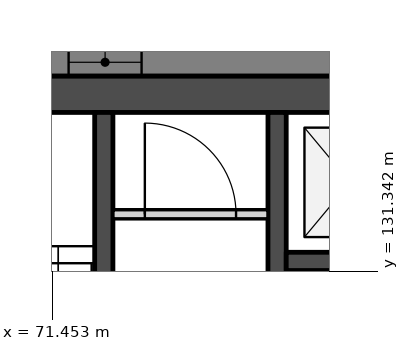
"""IFC4 building model, lengths in metres.
Left out: names, types, materials, properties, quantities, classifications, styles, units other than length and angle.
Written with IfcOpenShell. Run it as: python <this file> out.ifc"""

import sys

from ifc_helpers import new_model, si_unit, direction, frame, frame_2d, origin, place, context, subcontext, project, spatial, polyline, rectangle, outline, extrude, element, fill, save


model = new_model("IFC4")
c1 = context("Model", 3, precision=1e-05, world=origin(), true_north=direction((0.0, 1.0)))
c2 = subcontext(c1, "Body", "Model", "MODEL_VIEW")
j1 = project(units=[si_unit("LENGTHUNIT", "METRE"), si_unit("PLANEANGLEUNIT", "RADIAN")], contexts=[c1])
p1 = place(None, origin())
s1 = spatial("IfcSite", under=j1, at=p1, CompositionType="ELEMENT")
p2 = place(p1, origin())
s2 = spatial("IfcBuilding", under=s1, at=p2, CompositionType="ELEMENT")
p3 = place(p2, frame((0.0, 0.0, 81.8)))
s3 = spatial("IfcBuildingStorey", under=s2, at=p3, CompositionType="ELEMENT", Elevation=81.8)
p4 = place(p3, frame((66.0, 134.25, 0.0), z_axis=(0.0, 0.0, 1.0), x_axis=(1.0, 0.0, 0.0)))
e1 = element("IfcWall", 1, at=p4, inside=s3, PredefinedType="SOLIDWALL", context=c2, shape_type="SweptSolid", body=[
    extrude(rectangle(XDim=28.0, YDim=0.6, at=frame_2d((14.0, 0.0))), origin(), (0.0, 0.0, 1.0), 3.35),
])
p5 = place(p3, frame((72.3, 133.95, 0.0), z_axis=(0.0, 0.0, 1.0), x_axis=(0.0, -1.0, 0.0)))
e2 = element("IfcWall", 2, at=p5, inside=s3, PredefinedType="SOLIDWALL", context=c2, shape_type="SweptSolid", body=[
    extrude(rectangle(XDim=11.7, YDim=0.3, at=frame_2d((5.85, 0.0))), origin(), (0.0, 0.0, 1.0), 3.35),
])
p6 = place(p5, frame((6.95, 0.0, 0.0)))
e3 = element("IfcOpeningElement", 3, at=p6, cuts=e2, PredefinedType="OPENING", context=c2, shape_type="SweptSolid", body=[
    extrude(rectangle(XDim=1.1, YDim=2.1, at=frame_2d((0.55, 1.05))), frame((0.0, 0.16, 0.0), z_axis=(0.0, -1.0, 0.0), x_axis=(1.0, 0.0, 0.0)), (0.0, 0.0, 1.0), 0.32),
])
p7 = place(p5, frame((9.35, 0.0, 0.0)))
e4 = element("IfcOpeningElement", 4, at=p7, cuts=e2, PredefinedType="OPENING", context=c2, shape_type="SweptSolid", body=[
    extrude(rectangle(XDim=0.9, YDim=2.1, at=frame_2d((0.45, 1.05))), frame((0.0, 0.16, 0.0), z_axis=(0.0, -1.0, 0.0), x_axis=(1.0, 0.0, 0.0)), (0.0, 0.0, 1.0), 0.32),
])
p8 = place(p5, frame((5.1, 0.0, 0.0)))
e5 = element("IfcOpeningElement", 5, at=p8, cuts=e2, PredefinedType="OPENING", context=c2, shape_type="SweptSolid", body=[
    extrude(rectangle(XDim=1.0, YDim=2.1, at=frame_2d((0.5, 1.05))), frame((0.0, 0.16, 0.0), z_axis=(0.0, -1.0, 0.0), x_axis=(1.0, 0.0, 0.0)), (0.0, 0.0, 1.0), 0.32),
])
p9 = place(p3, frame((72.45, 132.275, 0.0), z_axis=(0.0, 0.0, 1.0), x_axis=(1.0, 0.0, 0.0)))
e6 = element("IfcWall", 6, at=p9, inside=s3, PredefinedType="PARTITIONING", context=c2, shape_type="SweptSolid", body=[
    extrude(rectangle(XDim=2.55, YDim=0.15, at=frame_2d((1.275, 0.0))), origin(), (0.0, 0.0, 1.0), 3.35),
])
p10 = place(p9, frame((0.525, 0.0, 0.0)))
e7 = element("IfcOpeningElement", 7, at=p10, cuts=e6, PredefinedType="OPENING", context=c2, shape_type="SweptSolid", body=[
    extrude(rectangle(XDim=1.5, YDim=2.1, at=frame_2d((0.75, 1.05))), frame((0.0, 0.085, 0.0), z_axis=(0.0, -1.0, 0.0), x_axis=(1.0, 0.0, 0.0)), (0.0, 0.0, 1.0), 0.17),
])
p11 = place(p3, frame((75.15, 133.95, 0.0), z_axis=(0.0, 0.0, 1.0), x_axis=(0.0, -1.0, 0.0)))
e8 = element("IfcWall", 8, at=p11, inside=s3, PredefinedType="SOLIDWALL", context=c2, shape_type="SweptSolid", body=[
    extrude(rectangle(XDim=11.7, YDim=0.3, at=frame_2d((5.85, 0.0))), origin(), (0.0, 0.0, 1.0), 3.35),
])
p12 = place(p3, frame((75.3, 131.5, 0.0), z_axis=(0.0, 0.0, 1.0), x_axis=(1.0, 0.0, 0.0)))
e9 = element("IfcWall", 9, at=p12, inside=s3, PredefinedType="SOLIDWALL", context=c2, shape_type="SweptSolid", body=[
    extrude(rectangle(XDim=2.1, YDim=0.3, at=frame_2d((1.05, 0.0))), origin(), (0.0, 0.0, 1.0), 3.35),
])
p13 = place(p3, frame((101.322, 134.775, -0.45), z_axis=(0.0, 0.0, 1.0), x_axis=(-1.0, 0.0, 0.0)))
e10 = element("IfcWall", 10, at=p13, inside=s3, PredefinedType="SOLIDWALL", context=c2, shape_type="SweptSolid", body=[
    extrude(outline(polyline([(42.643, 0.0), (42.643, 3.8), (0.0, 3.8), (0.0, 0.0), (42.643, 0.0)])), frame((0.0, 0.225, 0.0), z_axis=(0.0, -1.0, 0.0), x_axis=(1.0, 0.0, 0.0)), (0.0, 0.0, 1.0), 0.45),
])
p14 = place(p13, frame((2.814, 0.0, 1.35)))
e11 = element("IfcOpeningElement", 11, at=p14, cuts=e10, PredefinedType="OPENING", context=c2, shape_type="SweptSolid", body=[
    extrude(rectangle(XDim=1.2, YDim=1.5, at=frame_2d((0.6, 0.75))), frame((0.0, 0.235, 0.0), z_axis=(0.0, -1.0, 0.0), x_axis=(1.0, 0.0, 0.0)), (0.0, 0.0, 1.0), 0.47),
])
p15 = place(p13, frame((4.514, 0.0, 1.35)))
e12 = element("IfcOpeningElement", 12, at=p15, cuts=e10, PredefinedType="OPENING", context=c2, shape_type="SweptSolid", body=[
    extrude(rectangle(XDim=1.2, YDim=1.5, at=frame_2d((0.6, 0.75))), frame((0.0, 0.235, 0.0), z_axis=(0.0, -1.0, 0.0), x_axis=(1.0, 0.0, 0.0)), (0.0, 0.0, 1.0), 0.47),
])
p16 = place(p13, frame((11.343, 0.0, 1.35)))
e13 = element("IfcOpeningElement", 13, at=p16, cuts=e10, PredefinedType="OPENING", context=c2, shape_type="SweptSolid", body=[
    extrude(rectangle(XDim=1.2, YDim=1.5, at=frame_2d((0.6, 0.75))), frame((0.0, 0.235, 0.0), z_axis=(0.0, -1.0, 0.0), x_axis=(1.0, 0.0, 0.0)), (0.0, 0.0, 1.0), 0.47),
])
p17 = place(p13, frame((13.043, 0.0, 1.35)))
e14 = element("IfcOpeningElement", 14, at=p17, cuts=e10, PredefinedType="OPENING", context=c2, shape_type="SweptSolid", body=[
    extrude(rectangle(XDim=1.2, YDim=1.5, at=frame_2d((0.6, 0.75))), frame((0.0, 0.235, 0.0), z_axis=(0.0, -1.0, 0.0), x_axis=(1.0, 0.0, 0.0)), (0.0, 0.0, 1.0), 0.47),
])
p18 = place(p13, frame((19.872, 0.0, 1.35)))
e15 = element("IfcOpeningElement", 15, at=p18, cuts=e10, PredefinedType="OPENING", context=c2, shape_type="SweptSolid", body=[
    extrude(rectangle(XDim=1.2, YDim=1.5, at=frame_2d((0.6, 0.75))), frame((0.0, 0.235, 0.0), z_axis=(0.0, -1.0, 0.0), x_axis=(1.0, 0.0, 0.0)), (0.0, 0.0, 1.0), 0.47),
])
p19 = place(p13, frame((21.572, 0.0, 1.35)))
e16 = element("IfcOpeningElement", 16, at=p19, cuts=e10, PredefinedType="OPENING", context=c2, shape_type="SweptSolid", body=[
    extrude(rectangle(XDim=1.2, YDim=1.5, at=frame_2d((0.6, 0.75))), frame((0.0, 0.235, 0.0), z_axis=(0.0, -1.0, 0.0), x_axis=(1.0, 0.0, 0.0)), (0.0, 0.0, 1.0), 0.47),
])
p20 = place(p13, frame((28.4, 0.0, 1.35)))
e17 = element("IfcOpeningElement", 17, at=p20, cuts=e10, PredefinedType="OPENING", context=c2, shape_type="SweptSolid", body=[
    extrude(rectangle(XDim=1.2, YDim=1.5, at=frame_2d((0.6, 0.75))), frame((0.0, 0.235, 0.0), z_axis=(0.0, -1.0, 0.0), x_axis=(1.0, 0.0, 0.0)), (0.0, 0.0, 1.0), 0.47),
])
p21 = place(p13, frame((30.1, 0.0, 1.35)))
e18 = element("IfcOpeningElement", 18, at=p21, cuts=e10, PredefinedType="OPENING", context=c2, shape_type="SweptSolid", body=[
    extrude(rectangle(XDim=1.2, YDim=1.5, at=frame_2d((0.6, 0.75))), frame((0.0, 0.235, 0.0), z_axis=(0.0, -1.0, 0.0), x_axis=(1.0, 0.0, 0.0)), (0.0, 0.0, 1.0), 0.47),
])
p22 = place(p13, frame((36.929, 0.0, 1.35)))
e19 = element("IfcOpeningElement", 19, at=p22, cuts=e10, PredefinedType="OPENING", context=c2, shape_type="SweptSolid", body=[
    extrude(rectangle(XDim=1.2, YDim=1.5, at=frame_2d((0.6, 0.75))), frame((0.0, 0.235, 0.0), z_axis=(0.0, -1.0, 0.0), x_axis=(1.0, 0.0, 0.0)), (0.0, 0.0, 1.0), 0.47),
])
p23 = place(p13, frame((38.629, 0.0, 1.35)))
e20 = element("IfcOpeningElement", 20, at=p23, cuts=e10, PredefinedType="OPENING", context=c2, shape_type="SweptSolid", body=[
    extrude(rectangle(XDim=1.2, YDim=1.5, at=frame_2d((0.6, 0.75))), frame((0.0, 0.235, 0.0), z_axis=(0.0, -1.0, 0.0), x_axis=(1.0, 0.0, 0.0)), (0.0, 0.0, 1.0), 0.47),
])
p24 = place(p10, origin())
e21 = element("IfcDoor", 21, at=p24, inside=s3, OperationType="DOUBLE_DOOR_DOUBLE_SWING", PredefinedType="DOOR", context=c2, shape_type="SweptSolid", body=[
    extrude(rectangle(XDim=1.5, YDim=2.1, at=frame_2d((0.75, 1.05))), frame((0.0, 0.025, 0.0), z_axis=(0.0, -1.0, 0.0), x_axis=(1.0, 0.0, 0.0)), (0.0, 0.0, 1.0), 0.05),
])
fill(e7, e21)
p25 = place(p20, origin())
e22 = element("IfcWindow", 22, at=p25, inside=s3, PartitioningType="SINGLE_PANEL", PredefinedType="WINDOW", context=c2, shape_type="SweptSolid", body=[
    extrude(rectangle(XDim=1.2, YDim=1.5, at=frame_2d((0.6, 0.75))), frame((0.0, 0.03, 0.0), z_axis=(0.0, -1.0, 0.0), x_axis=(1.0, 0.0, 0.0)), (0.0, 0.0, 1.0), 0.06),
])
fill(e17, e22)
save(model, sys.argv[1])
